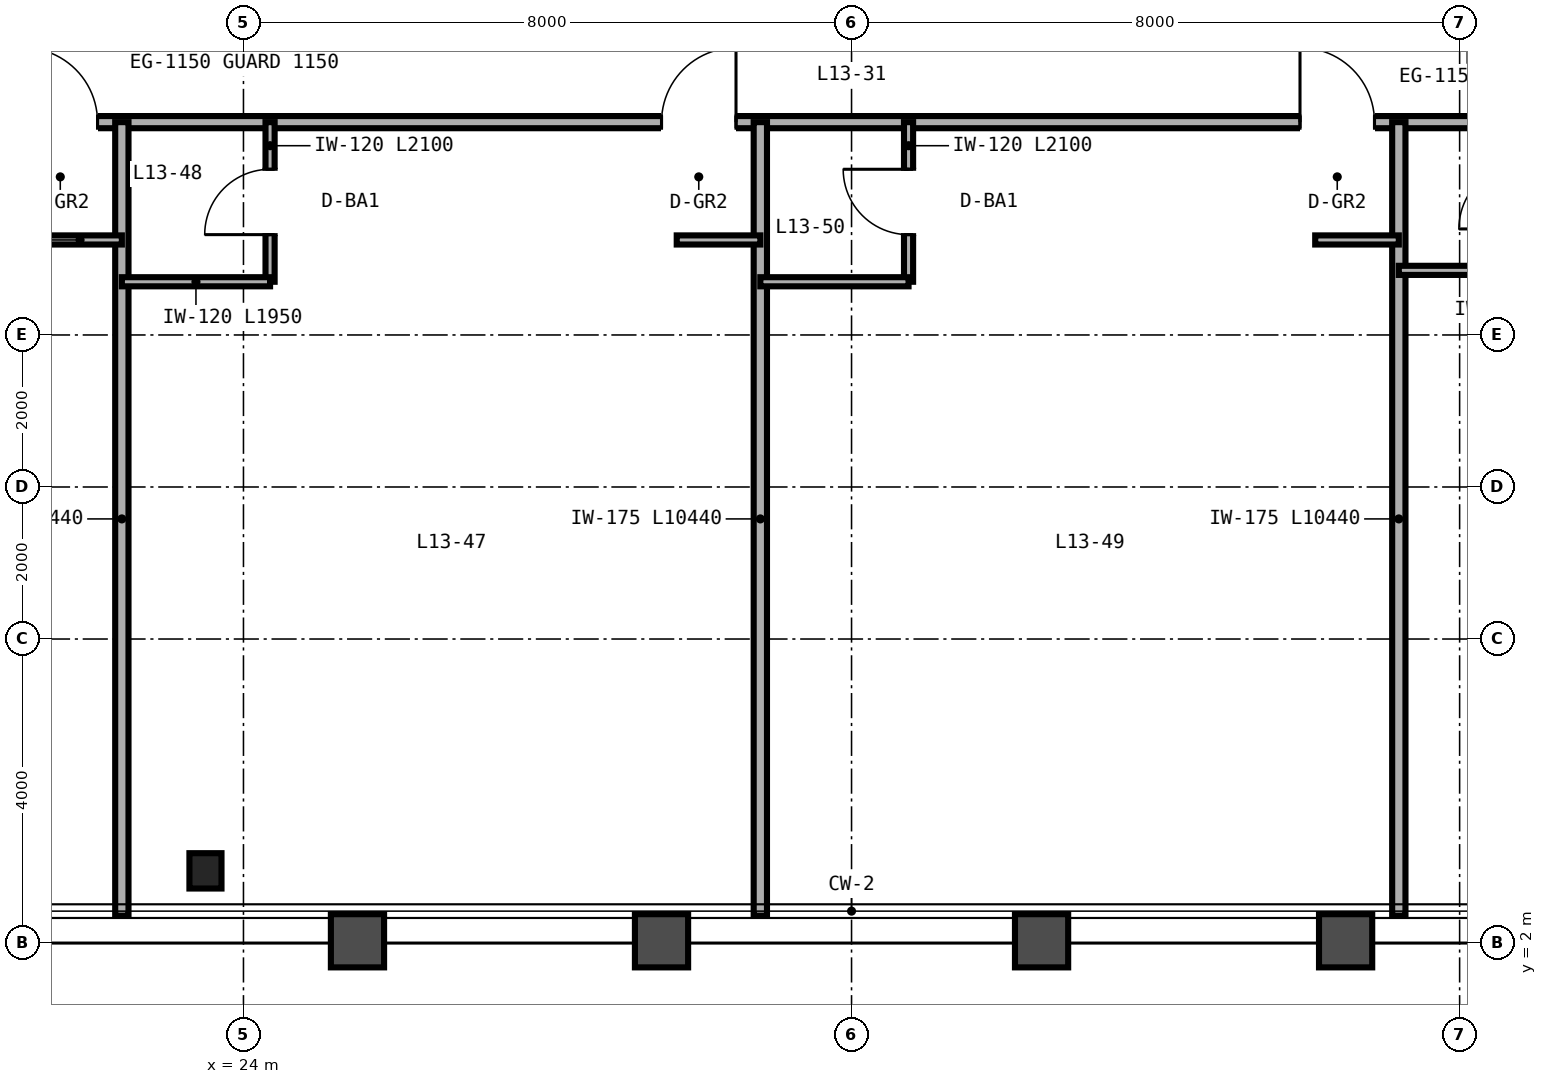
"""IFC4 building model, lengths in metres.
Left out: names, types, materials, properties, quantities, classifications, styles, units other than length and angle.
Written with IfcOpenShell. Run it as: python <this file> out.ifc"""

import sys

from ifc_helpers import new_model, si_unit, direction, frame, frame_2d, origin, origin_2d, place, context, subcontext, project, spatial, rectangle, i_section, extrude, source, transform, mapped, element, fill, save


model = new_model("IFC4")
c1 = context("Model", 3, precision=1e-05, world=origin(), true_north=direction((0.0, 1.0)))
c2 = subcontext(c1, "Body", "Model", "MODEL_VIEW")
j1 = project(units=[si_unit("LENGTHUNIT", "METRE"), si_unit("PLANEANGLEUNIT", "RADIAN")], contexts=[c1])
p1 = place(None, origin())
s1 = spatial("IfcSite", under=j1, at=p1, CompositionType="ELEMENT")
p2 = place(p1, origin())
s2 = spatial("IfcBuilding", under=s1, at=p2, CompositionType="ELEMENT")
p3 = place(p2, frame((0.0, 0.0, 56.4)))
s3 = spatial("IfcBuildingStorey", under=s2, at=p3, CompositionType="ELEMENT", Elevation=56.4)
m1 = source(origin(), c2, "Body", "SweptSolid", [
    extrude(i_section(OverallWidth=0.422, OverallDepth=0.465, WebThickness=0.045, FlangeThickness=0.073, FilletRadius=0.025, at=origin_2d()), origin(), (0.0, 0.0, 1.0), 3.35),
])
p4 = place(p3, frame((23.5, 2.95, 0.0), z_axis=(0.0, 0.0, 1.0), x_axis=(1.0, 0.0, 0.0)))
e1 = element("IfcColumn", 1, at=p4, inside=s3, PredefinedType="COLUMN", context=c2, shape_type="MappedRepresentation", body=[
    mapped(m1, transform((0.0, 0.0, 0.0), scale=1.0)),
])
p5 = place(p3, frame((14.0, 12.8, 0.0), z_axis=(0.0, 0.0, 1.0), x_axis=(1.0, 0.0, 0.0)))
e2 = element("IfcWall", 2, at=p5, inside=s3, PredefinedType="PARTITIONING", context=c2, shape_type="SweptSolid", body=[
    extrude(rectangle(XDim=36.0, YDim=0.16, at=frame_2d((18.0, 0.0))), origin(), (0.0, 0.0, 1.0), 2.571),
])
p6 = place(p5, frame((7.1, 0.0, 0.0)))
e3 = element("IfcOpeningElement", 3, at=p6, cuts=e2, PredefinedType="OPENING", context=c2, shape_type="SweptSolid", body=[
    extrude(rectangle(XDim=0.98, YDim=2.2, at=frame_2d((0.49, 1.1))), frame((0.0, 0.09, 0.0), z_axis=(0.0, -1.0, 0.0), x_axis=(1.0, 0.0, 0.0)), (0.0, 0.0, 1.0), 0.18),
])
p7 = place(p5, frame((15.5, 0.0, 0.0)))
e4 = element("IfcOpeningElement", 4, at=p7, cuts=e2, PredefinedType="OPENING", context=c2, shape_type="SweptSolid", body=[
    extrude(rectangle(XDim=0.98, YDim=2.2, at=frame_2d((0.49, 1.1))), frame((0.0, 0.09, 0.0), z_axis=(0.0, -1.0, 0.0), x_axis=(1.0, 0.0, 0.0)), (0.0, 0.0, 1.0), 0.18),
])
p8 = place(p5, frame((23.9, 0.0, 0.0)))
e5 = element("IfcOpeningElement", 5, at=p8, cuts=e2, PredefinedType="OPENING", context=c2, shape_type="SweptSolid", body=[
    extrude(rectangle(XDim=0.98, YDim=2.2, at=frame_2d((0.49, 1.1))), frame((0.0, 0.09, 0.0), z_axis=(0.0, -1.0, 0.0), x_axis=(1.0, 0.0, 0.0)), (0.0, 0.0, 1.0), 0.18),
])
p9 = place(p5, frame((29.34, 0.0, 0.0)))
e6 = element("IfcOpeningElement", 6, at=p9, cuts=e2, PredefinedType="OPENING", context=c2, shape_type="SweptSolid", body=[
    extrude(rectangle(XDim=0.94, YDim=2.15, at=frame_2d((0.47, 1.075))), frame((0.0, 0.09, 0.0), z_axis=(0.0, -1.0, 0.0), x_axis=(1.0, 0.0, 0.0)), (0.0, 0.0, 1.0), 0.18),
])
p10 = place(p5, frame((34.74, 0.0, 0.0)))
e7 = element("IfcOpeningElement", 7, at=p10, cuts=e2, PredefinedType="OPENING", context=c2, shape_type="SweptSolid", body=[
    extrude(rectangle(XDim=0.94, YDim=2.15, at=frame_2d((0.47, 1.075))), frame((0.0, 0.09, 0.0), z_axis=(0.0, -1.0, 0.0), x_axis=(1.0, 0.0, 0.0)), (0.0, 0.0, 1.0), 0.18),
])
p11 = place(p3, frame((22.4, 2.36, 0.0), z_axis=(0.0, 0.0, 1.0), x_axis=(0.0, 1.0, 0.0)))
e8 = element("IfcWall", 8, at=p11, inside=s3, PredefinedType="PARTITIONING", context=c2, shape_type="SweptSolid", body=[
    extrude(rectangle(XDim=10.44, YDim=0.175, at=frame_2d((5.22, 0.0))), origin(), (0.0, 0.0, 1.0), 2.813),
])
p12 = place(p3, frame((21.3, 11.25, 0.0), z_axis=(0.0, 0.0, 1.0), x_axis=(1.0, 0.0, 0.0)))
e9 = element("IfcWall", 9, at=p12, inside=s3, PredefinedType="PARTITIONING", context=c2, shape_type="SweptSolid", body=[
    extrude(rectangle(XDim=1.1, YDim=0.12, at=frame_2d((0.55, 0.0))), origin(), (0.0, 0.0, 1.0), 3.35),
])
p13 = place(p3, frame((30.8, 2.36, 0.0), z_axis=(0.0, 0.0, 1.0), x_axis=(0.0, 1.0, 0.0)))
e10 = element("IfcWall", 10, at=p13, inside=s3, PredefinedType="PARTITIONING", context=c2, shape_type="SweptSolid", body=[
    extrude(rectangle(XDim=10.44, YDim=0.175, at=frame_2d((5.22, 0.0))), origin(), (0.0, 0.0, 1.0), 2.423),
])
p14 = place(p3, frame((24.35, 10.7, 0.0), z_axis=(0.0, 0.0, 1.0), x_axis=(0.0, 1.0, 0.0)))
e11 = element("IfcWall", 11, at=p14, inside=s3, PredefinedType="PARTITIONING", context=c2, shape_type="SweptSolid", body=[
    extrude(rectangle(XDim=2.1, YDim=0.12, at=frame_2d((1.05, 0.0))), origin(), (0.0, 0.0, 1.0), 3.35),
])
p15 = place(p14, frame((0.62, 0.0, 0.0)))
e12 = element("IfcOpeningElement", 12, at=p15, cuts=e11, PredefinedType="OPENING", context=c2, shape_type="SweptSolid", body=[
    extrude(rectangle(XDim=0.86, YDim=2.1, at=frame_2d((0.43, 1.05))), frame((0.0, 0.07, 0.0), z_axis=(0.0, -1.0, 0.0), x_axis=(1.0, 0.0, 0.0)), (0.0, 0.0, 1.0), 0.14),
])
p16 = place(p3, frame((22.4, 10.7, 0.0), z_axis=(0.0, 0.0, 1.0), x_axis=(1.0, 0.0, 0.0)))
e13 = element("IfcWall", 13, at=p16, inside=s3, PredefinedType="PARTITIONING", context=c2, shape_type="SweptSolid", body=[
    extrude(rectangle(XDim=1.95, YDim=0.12, at=frame_2d((0.975, 0.0))), origin(), (0.0, 0.0, 1.0), 2.571),
])
p17 = place(p3, frame((29.7, 11.25, 0.0), z_axis=(0.0, 0.0, 1.0), x_axis=(1.0, 0.0, 0.0)))
e14 = element("IfcWall", 14, at=p17, inside=s3, PredefinedType="PARTITIONING", context=c2, shape_type="SweptSolid", body=[
    extrude(rectangle(XDim=1.1, YDim=0.12, at=frame_2d((0.55, 0.0))), origin(), (0.0, 0.0, 1.0), 3.35),
])
p18 = place(p3, frame((39.2, 2.36, 0.0), z_axis=(0.0, 0.0, 1.0), x_axis=(0.0, 1.0, 0.0)))
e15 = element("IfcWall", 15, at=p18, inside=s3, PredefinedType="PARTITIONING", context=c2, shape_type="SweptSolid", body=[
    extrude(rectangle(XDim=10.44, YDim=0.175, at=frame_2d((5.22, 0.0))), origin(), (0.0, 0.0, 1.0), 2.423),
])
p19 = place(p3, frame((32.75, 10.7, 0.0), z_axis=(0.0, 0.0, 1.0), x_axis=(0.0, 1.0, 0.0)))
e16 = element("IfcWall", 16, at=p19, inside=s3, PredefinedType="PARTITIONING", context=c2, shape_type="SweptSolid", body=[
    extrude(rectangle(XDim=2.1, YDim=0.12, at=frame_2d((1.05, 0.0))), origin(), (0.0, 0.0, 1.0), 3.35),
])
p20 = place(p19, frame((0.62, 0.0, 0.0)))
e17 = element("IfcOpeningElement", 17, at=p20, cuts=e16, PredefinedType="OPENING", context=c2, shape_type="SweptSolid", body=[
    extrude(rectangle(XDim=0.86, YDim=2.1, at=frame_2d((0.43, 1.05))), frame((0.0, 0.07, 0.0), z_axis=(0.0, -1.0, 0.0), x_axis=(1.0, 0.0, 0.0)), (0.0, 0.0, 1.0), 0.14),
])
p21 = place(p3, frame((30.8, 10.7, 0.0), z_axis=(0.0, 0.0, 1.0), x_axis=(1.0, 0.0, 0.0)))
e18 = element("IfcWall", 18, at=p21, inside=s3, PredefinedType="PARTITIONING", context=c2, shape_type="SweptSolid", body=[
    extrude(rectangle(XDim=1.95, YDim=0.12, at=frame_2d((0.975, 0.0))), origin(), (0.0, 0.0, 1.0), 3.35),
])
p22 = place(p3, frame((38.1, 11.25, 0.0), z_axis=(0.0, 0.0, 1.0), x_axis=(1.0, 0.0, 0.0)))
e19 = element("IfcWall", 19, at=p22, inside=s3, PredefinedType="PARTITIONING", context=c2, shape_type="SweptSolid", body=[
    extrude(rectangle(XDim=1.1, YDim=0.12, at=frame_2d((0.55, 0.0))), origin(), (0.0, 0.0, 1.0), 3.35),
])
p23 = place(p3, frame((39.2, 10.85, 0.0), z_axis=(0.0, 0.0, 1.0), x_axis=(1.0, 0.0, 0.0)))
e20 = element("IfcWall", 20, at=p23, inside=s3, PredefinedType="PARTITIONING", context=c2, shape_type="SweptSolid", body=[
    extrude(rectangle(XDim=1.65, YDim=0.12, at=frame_2d((0.825, 0.0))), origin(), (0.0, 0.0, 1.0), 2.571),
])
m2 = source(origin(), c2, "Body", "SweptSolid", [
    extrude(rectangle(XDim=0.86, YDim=2.1, at=frame_2d((0.43, 1.05))), frame((0.0, 0.025, 0.0), z_axis=(0.0, -1.0, 0.0), x_axis=(1.0, 0.0, 0.0)), (0.0, 0.0, 1.0), 0.05),
])
p24 = place(p15, origin())
e21 = element("IfcDoor", 21, at=p24, inside=s3, OperationType="SINGLE_SWING_LEFT", PredefinedType="DOOR", context=c2, shape_type="MappedRepresentation", body=[
    mapped(m2, transform((0.0, 0.0, 0.0), scale=1.0)),
])
fill(e12, e21)
p25 = place(p20, origin())
e22 = element("IfcDoor", 22, at=p25, inside=s3, OperationType="SINGLE_SWING_RIGHT", PredefinedType="DOOR", context=c2, shape_type="MappedRepresentation", body=[
    mapped(m2, transform((0.0, 0.0, 0.0), scale=1.0)),
])
fill(e17, e22)
m3 = source(origin(), c2, "Body", "SweptSolid", [
    extrude(rectangle(XDim=0.98, YDim=2.2, at=frame_2d((0.49, 1.1))), frame((0.0, 0.025, 0.0), z_axis=(0.0, -1.0, 0.0), x_axis=(1.0, 0.0, 0.0)), (0.0, 0.0, 1.0), 0.05),
])
p26 = place(p6, origin())
e23 = element("IfcDoor", 23, at=p26, inside=s3, OperationType="SINGLE_SWING_LEFT", PredefinedType="DOOR", context=c2, shape_type="MappedRepresentation", body=[
    mapped(m3, transform((0.0, 0.0, 0.0), scale=1.0)),
])
fill(e3, e23)
p27 = place(p7, origin())
e24 = element("IfcDoor", 24, at=p27, inside=s3, OperationType="SINGLE_SWING_RIGHT", PredefinedType="DOOR", context=c2, shape_type="MappedRepresentation", body=[
    mapped(m3, transform((0.0, 0.0, 0.0), scale=1.0)),
])
fill(e4, e24)
p28 = place(p8, origin())
e25 = element("IfcDoor", 25, at=p28, inside=s3, OperationType="SINGLE_SWING_LEFT", PredefinedType="DOOR", context=c2, shape_type="MappedRepresentation", body=[
    mapped(m3, transform((0.0, 0.0, 0.0), scale=1.0)),
])
fill(e5, e25)
save(model, sys.argv[1])
